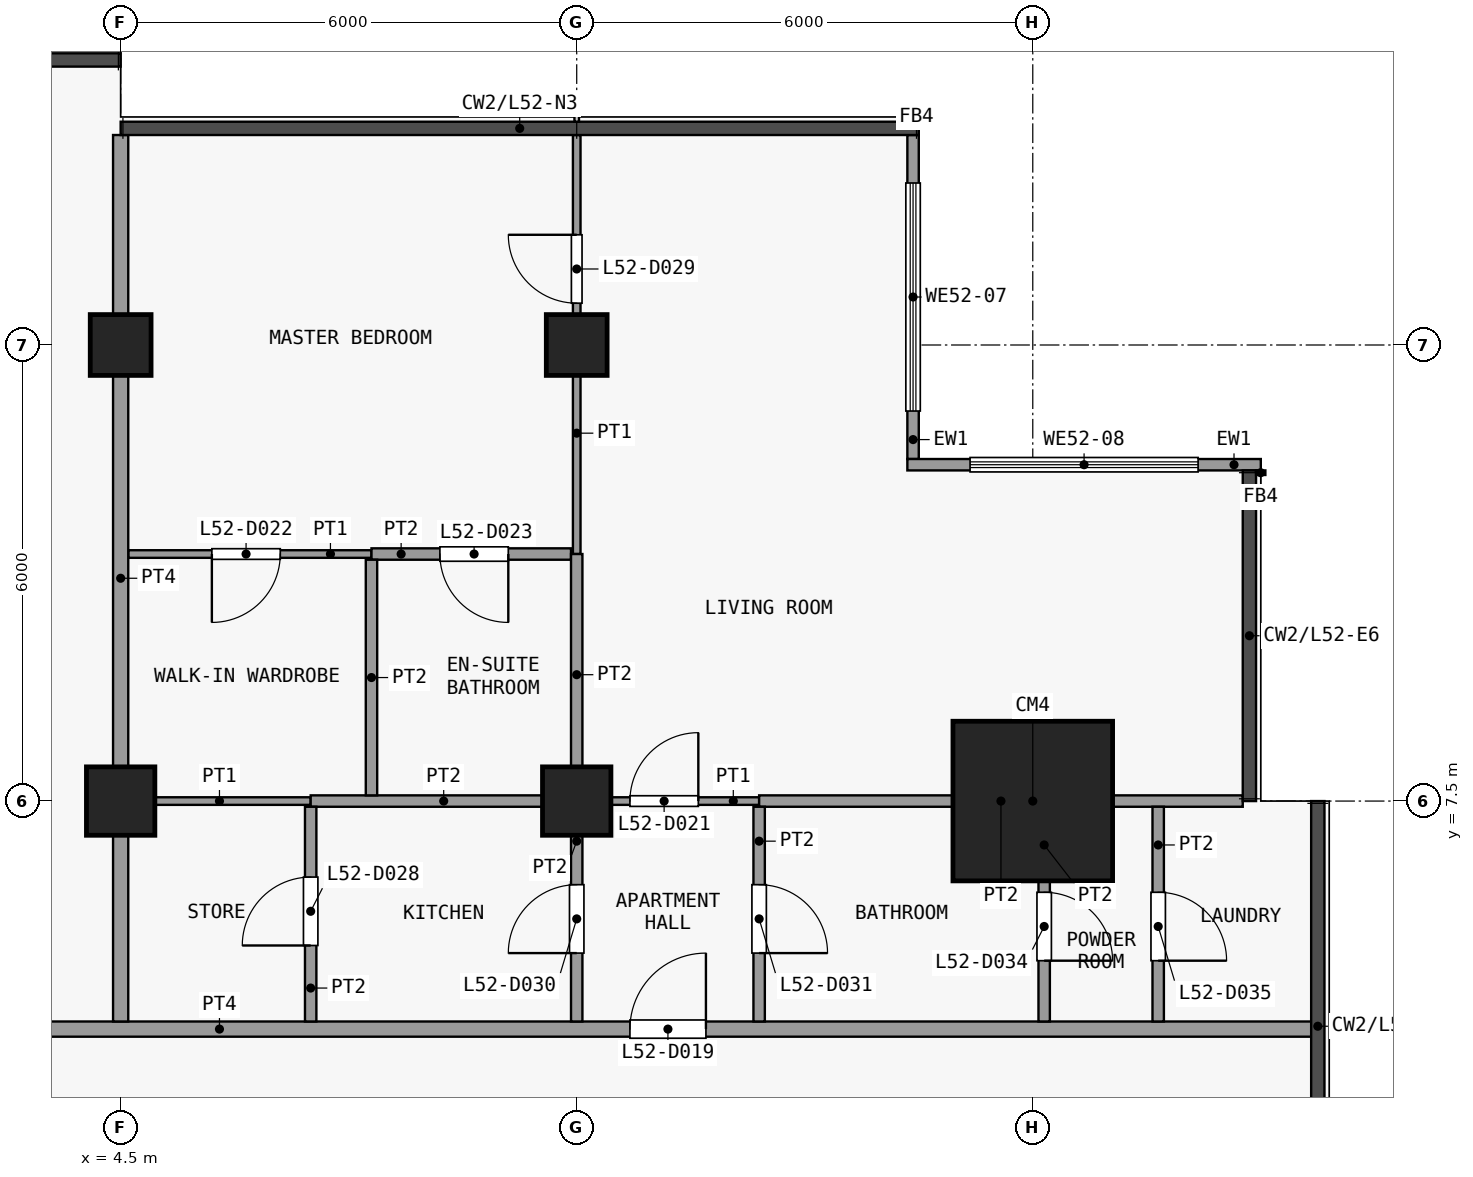
"""IFC4 building model, lengths in metres.
Left out: names, types, materials, properties, quantities, classifications, styles, units other than length and angle.
Written with IfcOpenShell. Run it as: python <this file> out.ifc"""

import sys

from ifc_helpers import new_model, si_unit, direction, frame, frame_2d, origin, origin_2d, place, context, subcontext, project, spatial, rectangle, extrude, element, fill, save


model = new_model("IFC4")
c1 = context("Model", 3, precision=1e-05, world=origin(), true_north=direction((0.0, 1.0)))
c2 = subcontext(c1, "Body", "Model", "MODEL_VIEW")
j1 = project(units=[si_unit("LENGTHUNIT", "METRE"), si_unit("PLANEANGLEUNIT", "RADIAN")], contexts=[c1])
p1 = place(None, origin())
s1 = spatial("IfcSite", under=j1, at=p1, CompositionType="ELEMENT")
p2 = place(p1, origin())
s2 = spatial("IfcBuilding", under=s1, at=p2, CompositionType="ELEMENT")
p3 = place(p2, frame((0.0, 0.0, 208.7)))
s3 = spatial("IfcBuildingStorey", under=s2, at=p3, CompositionType="ELEMENT", Elevation=208.7)
p4 = place(p3, frame((4.5, 7.5, 0.0), z_axis=(0.0, 0.0, 1.0), x_axis=(1.0, 0.0, 0.0)))
e1 = element("IfcColumn", 1, at=p4, inside=s3, PredefinedType="COLUMN", context=c2, shape_type="SweptSolid", body=[
    extrude(rectangle(XDim=0.9, YDim=0.9, at=origin_2d()), origin(), (0.0, 0.0, 1.0), 3.6),
])
p5 = place(p3, frame((4.5, 13.5, 0.0), z_axis=(0.0, 0.0, 1.0), x_axis=(1.0, 0.0, 0.0)))
e2 = element("IfcColumn", 2, at=p5, inside=s3, PredefinedType="COLUMN", context=c2, shape_type="SweptSolid", body=[
    extrude(rectangle(XDim=0.8, YDim=0.8, at=origin_2d()), origin(), (0.0, 0.0, 1.0), 3.6),
])
p6 = place(p3, frame((10.5, 7.5, 0.0), z_axis=(0.0, 0.0, 1.0), x_axis=(1.0, 0.0, 0.0)))
e3 = element("IfcColumn", 3, at=p6, inside=s3, PredefinedType="COLUMN", context=c2, shape_type="SweptSolid", body=[
    extrude(rectangle(XDim=0.9, YDim=0.9, at=origin_2d()), origin(), (0.0, 0.0, 1.0), 3.6),
])
p7 = place(p3, frame((10.5, 13.5, 0.0), z_axis=(0.0, 0.0, 1.0), x_axis=(1.0, 0.0, 0.0)))
e4 = element("IfcColumn", 4, at=p7, inside=s3, PredefinedType="COLUMN", context=c2, shape_type="SweptSolid", body=[
    extrude(rectangle(XDim=0.8, YDim=0.8, at=origin_2d()), origin(), (0.0, 0.0, 1.0), 3.6),
])
p8 = place(p3, frame((16.5, 7.5, 0.0), z_axis=(0.0, 0.0, 1.0), x_axis=(1.0, 0.0, 0.0)))
e5 = element("IfcColumn", 5, at=p8, inside=s3, PredefinedType="COLUMN", context=c2, shape_type="SweptSolid", body=[
    extrude(rectangle(XDim=2.1, YDim=2.1, at=origin_2d()), origin(), (0.0, 0.0, 1.0), 3.6),
])
p9 = place(p3, frame((14.925, 16.262, 0.0), z_axis=(0.0, 0.0, 1.0), x_axis=(0.0, -1.0, 0.0)))
e6 = element("IfcWall", 6, at=p9, inside=s3, PredefinedType="SOLIDWALL", context=c2, shape_type="SweptSolid", body=[
    extrude(rectangle(XDim=4.262, YDim=0.15, at=frame_2d((2.131, 0.0))), origin(), (0.0, 0.0, 1.0), 3.3),
])
p10 = place(p9, frame((0.631, 0.0, 0.9)))
e7 = element("IfcOpeningElement", 7, at=p10, cuts=e6, PredefinedType="OPENING", context=c2, shape_type="SweptSolid", body=[
    extrude(rectangle(XDim=3.0, YDim=2.4, at=frame_2d((1.5, 1.2))), frame((0.0, 0.085, 0.0), z_axis=(0.0, -1.0, 0.0), x_axis=(1.0, 0.0, 0.0)), (0.0, 0.0, 1.0), 0.17),
])
p11 = place(p3, frame((14.85, 11.925, 0.0), z_axis=(0.0, 0.0, 1.0), x_axis=(1.0, 0.0, 0.0)))
e8 = element("IfcWall", 8, at=p11, inside=s3, PredefinedType="SOLIDWALL", context=c2, shape_type="SweptSolid", body=[
    extrude(rectangle(XDim=4.65, YDim=0.15, at=frame_2d((2.325, 0.0))), origin(), (0.0, 0.0, 1.0), 3.3),
])
p12 = place(p11, frame((0.825, 0.0, 0.9)))
e9 = element("IfcOpeningElement", 9, at=p12, cuts=e8, PredefinedType="OPENING", context=c2, shape_type="SweptSolid", body=[
    extrude(rectangle(XDim=3.0, YDim=2.4, at=frame_2d((1.5, 1.2))), frame((0.0, 0.085, 0.0), z_axis=(0.0, -1.0, 0.0), x_axis=(1.0, 0.0, 0.0)), (0.0, 0.0, 1.0), 0.17),
])
p13 = place(p3, frame((-17.85, 4.5, 0.0), z_axis=(0.0, 0.0, 1.0), x_axis=(1.0, 0.0, 0.0)))
e10 = element("IfcWall", 10, at=p13, inside=s3, PredefinedType="PARTITIONING", context=c2, shape_type="SweptSolid", body=[
    extrude(rectangle(XDim=38.1, YDim=0.2, at=frame_2d((19.05, 0.0))), origin(), (0.0, 0.0, 1.0), 3.3),
])
p14 = place(p13, frame((3.05, 0.0, 0.0)))
e11 = element("IfcOpeningElement", 11, at=p14, cuts=e10, PredefinedType="OPENING", context=c2, shape_type="SweptSolid", body=[
    extrude(rectangle(XDim=1.0, YDim=2.1, at=frame_2d((0.5, 1.05))), frame((0.0, 0.11, 0.0), z_axis=(0.0, -1.0, 0.0), x_axis=(1.0, 0.0, 0.0)), (0.0, 0.0, 1.0), 0.22),
])
p15 = place(p13, frame((9.85, 0.0, 0.0)))
e12 = element("IfcOpeningElement", 12, at=p15, cuts=e10, PredefinedType="OPENING", context=c2, shape_type="SweptSolid", body=[
    extrude(rectangle(XDim=0.9, YDim=2.1, at=frame_2d((0.45, 1.05))), frame((0.0, 0.11, 0.0), z_axis=(0.0, -1.0, 0.0), x_axis=(1.0, 0.0, 0.0)), (0.0, 0.0, 1.0), 0.22),
])
p16 = place(p13, frame((17.35, 0.0, 0.0)))
e13 = element("IfcOpeningElement", 13, at=p16, cuts=e10, PredefinedType="OPENING", context=c2, shape_type="SweptSolid", body=[
    extrude(rectangle(XDim=0.9, YDim=2.1, at=frame_2d((0.45, 1.05))), frame((0.0, 0.11, 0.0), z_axis=(0.0, -1.0, 0.0), x_axis=(1.0, 0.0, 0.0)), (0.0, 0.0, 1.0), 0.22),
])
p17 = place(p13, frame((29.05, 0.0, 0.0)))
e14 = element("IfcOpeningElement", 14, at=p17, cuts=e10, PredefinedType="OPENING", context=c2, shape_type="SweptSolid", body=[
    extrude(rectangle(XDim=1.0, YDim=2.1, at=frame_2d((0.5, 1.05))), frame((0.0, 0.11, 0.0), z_axis=(0.0, -1.0, 0.0), x_axis=(1.0, 0.0, 0.0)), (0.0, 0.0, 1.0), 0.22),
])
p18 = place(p3, frame((4.6, 7.5, 0.0), z_axis=(0.0, 0.0, 1.0), x_axis=(1.0, 0.0, 0.0)))
e15 = element("IfcWall", 15, at=p18, inside=s3, PredefinedType="PARTITIONING", context=c2, shape_type="SweptSolid", body=[
    extrude(rectangle(XDim=2.4, YDim=0.1, at=frame_2d((1.2, 0.0))), origin(), (0.0, 0.0, 1.0), 3.3),
])
p19 = place(p3, frame((10.5, 7.5, 0.0), z_axis=(0.0, 0.0, 1.0), x_axis=(1.0, 0.0, 0.0)))
e16 = element("IfcWall", 16, at=p19, inside=s3, PredefinedType="PARTITIONING", context=c2, shape_type="SweptSolid", body=[
    extrude(rectangle(XDim=2.4, YDim=0.1, at=frame_2d((1.2, 0.0))), origin(), (0.0, 0.0, 1.0), 3.3),
])
p20 = place(p19, frame((0.7, 0.0, 0.0)))
e17 = element("IfcOpeningElement", 17, at=p20, cuts=e16, PredefinedType="OPENING", context=c2, shape_type="SweptSolid", body=[
    extrude(rectangle(XDim=0.9, YDim=2.1, at=frame_2d((0.45, 1.05))), frame((0.0, 0.06, 0.0), z_axis=(0.0, -1.0, 0.0), x_axis=(1.0, 0.0, 0.0)), (0.0, 0.0, 1.0), 0.12),
])
p21 = place(p3, frame((7.0, 7.5, 0.0), z_axis=(0.0, 0.0, 1.0), x_axis=(1.0, 0.0, 0.0)))
e18 = element("IfcWall", 18, at=p21, inside=s3, PredefinedType="PARTITIONING", context=c2, shape_type="SweptSolid", body=[
    extrude(rectangle(XDim=3.5, YDim=0.15, at=frame_2d((1.75, 0.0))), origin(), (0.0, 0.0, 1.0), 3.3),
])
p22 = place(p3, frame((12.9, 7.5, 0.0), z_axis=(0.0, 0.0, 1.0), x_axis=(1.0, 0.0, 0.0)))
e19 = element("IfcWall", 19, at=p22, inside=s3, PredefinedType="PARTITIONING", context=c2, shape_type="SweptSolid", body=[
    extrude(rectangle(XDim=6.363, YDim=0.15, at=frame_2d((3.181, 0.0))), origin(), (0.0, 0.0, 1.0), 3.3),
])
p23 = place(p3, frame((4.6, 10.75, 0.0), z_axis=(0.0, 0.0, 1.0), x_axis=(1.0, 0.0, 0.0)))
e20 = element("IfcWall", 20, at=p23, inside=s3, PredefinedType="PARTITIONING", context=c2, shape_type="SweptSolid", body=[
    extrude(rectangle(XDim=3.2, YDim=0.1, at=frame_2d((1.6, 0.0))), origin(), (0.0, 0.0, 1.0), 3.3),
])
p24 = place(p23, frame((1.1, 0.0, 0.0)))
e21 = element("IfcOpeningElement", 21, at=p24, cuts=e20, PredefinedType="OPENING", context=c2, shape_type="SweptSolid", body=[
    extrude(rectangle(XDim=0.9, YDim=2.1, at=frame_2d((0.45, 1.05))), frame((0.0, 0.06, 0.0), z_axis=(0.0, -1.0, 0.0), x_axis=(1.0, 0.0, 0.0)), (0.0, 0.0, 1.0), 0.12),
])
p25 = place(p3, frame((7.8, 10.75, 0.0), z_axis=(0.0, 0.0, 1.0), x_axis=(1.0, 0.0, 0.0)))
e22 = element("IfcWall", 22, at=p25, inside=s3, PredefinedType="PARTITIONING", context=c2, shape_type="SweptSolid", body=[
    extrude(rectangle(XDim=2.625, YDim=0.15, at=frame_2d((1.312, 0.0))), origin(), (0.0, 0.0, 1.0), 3.3),
])
p26 = place(p25, frame((0.9, 0.0, 0.0)))
e23 = element("IfcOpeningElement", 23, at=p26, cuts=e22, PredefinedType="OPENING", context=c2, shape_type="SweptSolid", body=[
    extrude(rectangle(XDim=0.9, YDim=2.1, at=frame_2d((0.45, 1.05))), frame((0.0, 0.085, 0.0), z_axis=(0.0, -1.0, 0.0), x_axis=(1.0, 0.0, 0.0)), (0.0, 0.0, 1.0), 0.17),
])
p27 = place(p3, frame((4.5, 4.6, 0.0), z_axis=(0.0, 0.0, 1.0), x_axis=(0.0, 1.0, 0.0)))
e24 = element("IfcWall", 24, at=p27, inside=s3, PredefinedType="PARTITIONING", context=c2, shape_type="SweptSolid", body=[
    extrude(rectangle(XDim=11.662, YDim=0.2, at=frame_2d((5.831, 0.0))), origin(), (0.0, 0.0, 1.0), 3.3),
])
p28 = place(p3, frame((7.0, 4.6, 0.0), z_axis=(0.0, 0.0, 1.0), x_axis=(0.0, 1.0, 0.0)))
e25 = element("IfcWall", 25, at=p28, inside=s3, PredefinedType="PARTITIONING", context=c2, shape_type="SweptSolid", body=[
    extrude(rectangle(XDim=2.825, YDim=0.15, at=frame_2d((1.413, 0.0))), origin(), (0.0, 0.0, 1.0), 3.3),
])
p29 = place(p28, frame((1.0, 0.0, 0.0)))
e26 = element("IfcOpeningElement", 26, at=p29, cuts=e25, PredefinedType="OPENING", context=c2, shape_type="SweptSolid", body=[
    extrude(rectangle(XDim=0.9, YDim=2.1, at=frame_2d((0.45, 1.05))), frame((0.0, 0.085, 0.0), z_axis=(0.0, -1.0, 0.0), x_axis=(1.0, 0.0, 0.0)), (0.0, 0.0, 1.0), 0.17),
])
p30 = place(p3, frame((7.8, 7.575, 0.0), z_axis=(0.0, 0.0, 1.0), x_axis=(0.0, 1.0, 0.0)))
e27 = element("IfcWall", 27, at=p30, inside=s3, PredefinedType="PARTITIONING", context=c2, shape_type="SweptSolid", body=[
    extrude(rectangle(XDim=3.1, YDim=0.15, at=frame_2d((1.55, 0.0))), origin(), (0.0, 0.0, 1.0), 3.3),
])
p31 = place(p3, frame((10.5, 10.75, 0.0), z_axis=(0.0, 0.0, 1.0), x_axis=(0.0, 1.0, 0.0)))
e28 = element("IfcWall", 28, at=p31, inside=s3, PredefinedType="PARTITIONING", context=c2, shape_type="SweptSolid", body=[
    extrude(rectangle(XDim=5.512, YDim=0.1, at=frame_2d((2.756, 0.0))), origin(), (0.0, 0.0, 1.0), 3.3),
])
p32 = place(p31, frame((3.3, 0.0, 0.0)))
e29 = element("IfcOpeningElement", 29, at=p32, cuts=e28, PredefinedType="OPENING", context=c2, shape_type="SweptSolid", body=[
    extrude(rectangle(XDim=0.9, YDim=2.1, at=frame_2d((0.45, 1.05))), frame((0.0, 0.06, 0.0), z_axis=(0.0, -1.0, 0.0), x_axis=(1.0, 0.0, 0.0)), (0.0, 0.0, 1.0), 0.12),
])
p33 = place(p3, frame((10.5, 4.6, 0.0), z_axis=(0.0, 0.0, 1.0), x_axis=(0.0, 1.0, 0.0)))
e30 = element("IfcWall", 30, at=p33, inside=s3, PredefinedType="PARTITIONING", context=c2, shape_type="SweptSolid", body=[
    extrude(rectangle(XDim=2.825, YDim=0.15, at=frame_2d((1.413, 0.0))), origin(), (0.0, 0.0, 1.0), 3.3),
])
p34 = place(p33, frame((0.9, 0.0, 0.0)))
e31 = element("IfcOpeningElement", 31, at=p34, cuts=e30, PredefinedType="OPENING", context=c2, shape_type="SweptSolid", body=[
    extrude(rectangle(XDim=0.9, YDim=2.1, at=frame_2d((0.45, 1.05))), frame((0.0, 0.085, 0.0), z_axis=(0.0, -1.0, 0.0), x_axis=(1.0, 0.0, 0.0)), (0.0, 0.0, 1.0), 0.17),
])
p35 = place(p3, frame((10.5, 7.575, 0.0), z_axis=(0.0, 0.0, 1.0), x_axis=(0.0, 1.0, 0.0)))
e32 = element("IfcWall", 32, at=p35, inside=s3, PredefinedType="PARTITIONING", context=c2, shape_type="SweptSolid", body=[
    extrude(rectangle(XDim=3.175, YDim=0.15, at=frame_2d((1.587, 0.0))), origin(), (0.0, 0.0, 1.0), 3.3),
])
p36 = place(p3, frame((12.9, 4.6, 0.0), z_axis=(0.0, 0.0, 1.0), x_axis=(0.0, 1.0, 0.0)))
e33 = element("IfcWall", 33, at=p36, inside=s3, PredefinedType="PARTITIONING", context=c2, shape_type="SweptSolid", body=[
    extrude(rectangle(XDim=2.825, YDim=0.15, at=frame_2d((1.413, 0.0))), origin(), (0.0, 0.0, 1.0), 3.3),
])
p37 = place(p36, frame((0.9, 0.0, 0.0)))
e34 = element("IfcOpeningElement", 34, at=p37, cuts=e33, PredefinedType="OPENING", context=c2, shape_type="SweptSolid", body=[
    extrude(rectangle(XDim=0.9, YDim=2.1, at=frame_2d((0.45, 1.05))), frame((0.0, 0.085, 0.0), z_axis=(0.0, -1.0, 0.0), x_axis=(1.0, 0.0, 0.0)), (0.0, 0.0, 1.0), 0.17),
])
p38 = place(p3, frame((16.65, 4.6, 0.0), z_axis=(0.0, 0.0, 1.0), x_axis=(0.0, 1.0, 0.0)))
e35 = element("IfcWall", 35, at=p38, inside=s3, PredefinedType="PARTITIONING", context=c2, shape_type="SweptSolid", body=[
    extrude(rectangle(XDim=2.825, YDim=0.15, at=frame_2d((1.413, 0.0))), origin(), (0.0, 0.0, 1.0), 3.3),
])
p39 = place(p38, frame((0.8, 0.0, 0.0)))
e36 = element("IfcOpeningElement", 36, at=p39, cuts=e35, PredefinedType="OPENING", context=c2, shape_type="SweptSolid", body=[
    extrude(rectangle(XDim=0.9, YDim=2.1, at=frame_2d((0.45, 1.05))), frame((0.0, 0.085, 0.0), z_axis=(0.0, -1.0, 0.0), x_axis=(1.0, 0.0, 0.0)), (0.0, 0.0, 1.0), 0.17),
])
p40 = place(p3, frame((18.15, 4.6, 0.0), z_axis=(0.0, 0.0, 1.0), x_axis=(0.0, 1.0, 0.0)))
e37 = element("IfcWall", 37, at=p40, inside=s3, PredefinedType="PARTITIONING", context=c2, shape_type="SweptSolid", body=[
    extrude(rectangle(XDim=2.825, YDim=0.15, at=frame_2d((1.413, 0.0))), origin(), (0.0, 0.0, 1.0), 3.3),
])
p41 = place(p40, frame((0.8, 0.0, 0.0)))
e38 = element("IfcOpeningElement", 38, at=p41, cuts=e37, PredefinedType="OPENING", context=c2, shape_type="SweptSolid", body=[
    extrude(rectangle(XDim=0.9, YDim=2.1, at=frame_2d((0.45, 1.05))), frame((0.0, 0.085, 0.0), z_axis=(0.0, -1.0, 0.0), x_axis=(1.0, 0.0, 0.0)), (0.0, 0.0, 1.0), 0.17),
])
p42 = place(p10, origin())
e39 = element("IfcWindow", 39, at=p42, inside=s3, PartitioningType="SINGLE_PANEL", PredefinedType="WINDOW", context=c2, shape_type="SweptSolid", body=[
    extrude(rectangle(XDim=3.0, YDim=2.4, at=frame_2d((1.5, 1.2))), frame((0.0, 0.03, 0.0), z_axis=(0.0, -1.0, 0.0), x_axis=(1.0, 0.0, 0.0)), (0.0, 0.0, 1.0), 0.06),
])
fill(e7, e39)
p43 = place(p12, origin())
e40 = element("IfcWindow", 40, at=p43, inside=s3, PartitioningType="SINGLE_PANEL", PredefinedType="WINDOW", context=c2, shape_type="SweptSolid", body=[
    extrude(rectangle(XDim=3.0, YDim=2.4, at=frame_2d((1.5, 1.2))), frame((0.0, 0.03, 0.0), z_axis=(0.0, -1.0, 0.0), x_axis=(1.0, 0.0, 0.0)), (0.0, 0.0, 1.0), 0.06),
])
fill(e9, e40)
p44 = place(p17, origin())
e41 = element("IfcDoor", 41, at=p44, inside=s3, OperationType="SINGLE_SWING_LEFT", PredefinedType="DOOR", context=c2, shape_type="SweptSolid", body=[
    extrude(rectangle(XDim=1.0, YDim=2.1, at=frame_2d((0.5, 1.05))), frame((0.0, 0.025, 0.0), z_axis=(0.0, -1.0, 0.0), x_axis=(1.0, 0.0, 0.0)), (0.0, 0.0, 1.0), 0.05),
])
fill(e14, e41)
p45 = place(p20, origin())
e42 = element("IfcDoor", 42, at=p45, inside=s3, OperationType="SINGLE_SWING_LEFT", PredefinedType="DOOR", context=c2, shape_type="SweptSolid", body=[
    extrude(rectangle(XDim=0.9, YDim=2.1, at=frame_2d((0.45, 1.05))), frame((0.0, 0.025, 0.0), z_axis=(0.0, -1.0, 0.0), x_axis=(1.0, 0.0, 0.0)), (0.0, 0.0, 1.0), 0.05),
])
fill(e17, e42)
p46 = place(p24, origin())
e43 = element("IfcDoor", 43, at=p46, inside=s3, OperationType="SINGLE_SWING_LEFT", PredefinedType="DOOR", context=c2, shape_type="SweptSolid", body=[
    extrude(rectangle(XDim=0.9, YDim=2.1, at=frame_2d((0.45, 1.05))), frame((0.0, 0.025, 0.0), z_axis=(0.0, -1.0, 0.0), x_axis=(1.0, 0.0, 0.0)), (0.0, 0.0, 1.0), 0.05),
])
fill(e21, e43)
p47 = place(p26, origin())
e44 = element("IfcDoor", 44, at=p47, inside=s3, OperationType="SINGLE_SWING_RIGHT", PredefinedType="DOOR", context=c2, shape_type="SweptSolid", body=[
    extrude(rectangle(XDim=0.9, YDim=2.1, at=frame_2d((0.45, 1.05))), frame((0.0, 0.025, 0.0), z_axis=(0.0, -1.0, 0.0), x_axis=(1.0, 0.0, 0.0)), (0.0, 0.0, 1.0), 0.05),
])
fill(e23, e44)
p48 = place(p29, origin())
e45 = element("IfcDoor", 45, at=p48, inside=s3, OperationType="SINGLE_SWING_RIGHT", PredefinedType="DOOR", context=c2, shape_type="SweptSolid", body=[
    extrude(rectangle(XDim=0.9, YDim=2.1, at=frame_2d((0.45, 1.05))), frame((0.0, 0.025, 0.0), z_axis=(0.0, -1.0, 0.0), x_axis=(1.0, 0.0, 0.0)), (0.0, 0.0, 1.0), 0.05),
])
fill(e26, e45)
p49 = place(p32, origin())
e46 = element("IfcDoor", 46, at=p49, inside=s3, OperationType="SINGLE_SWING_LEFT", PredefinedType="DOOR", context=c2, shape_type="SweptSolid", body=[
    extrude(rectangle(XDim=0.9, YDim=2.1, at=frame_2d((0.45, 1.05))), frame((0.0, 0.025, 0.0), z_axis=(0.0, -1.0, 0.0), x_axis=(1.0, 0.0, 0.0)), (0.0, 0.0, 1.0), 0.05),
])
fill(e29, e46)
p50 = place(p34, origin())
e47 = element("IfcDoor", 47, at=p50, inside=s3, OperationType="SINGLE_SWING_RIGHT", PredefinedType="DOOR", context=c2, shape_type="SweptSolid", body=[
    extrude(rectangle(XDim=0.9, YDim=2.1, at=frame_2d((0.45, 1.05))), frame((0.0, 0.025, 0.0), z_axis=(0.0, -1.0, 0.0), x_axis=(1.0, 0.0, 0.0)), (0.0, 0.0, 1.0), 0.05),
])
fill(e31, e47)
p51 = place(p37, origin())
e48 = element("IfcDoor", 48, at=p51, inside=s3, OperationType="SINGLE_SWING_LEFT", PredefinedType="DOOR", context=c2, shape_type="SweptSolid", body=[
    extrude(rectangle(XDim=0.9, YDim=2.1, at=frame_2d((0.45, 1.05))), frame((0.0, 0.025, 0.0), z_axis=(0.0, -1.0, 0.0), x_axis=(1.0, 0.0, 0.0)), (0.0, 0.0, 1.0), 0.05),
])
fill(e34, e48)
p52 = place(p39, origin())
e49 = element("IfcDoor", 49, at=p52, inside=s3, OperationType="SINGLE_SWING_LEFT", PredefinedType="DOOR", context=c2, shape_type="SweptSolid", body=[
    extrude(rectangle(XDim=0.9, YDim=2.1, at=frame_2d((0.45, 1.05))), frame((0.0, 0.025, 0.0), z_axis=(0.0, -1.0, 0.0), x_axis=(1.0, 0.0, 0.0)), (0.0, 0.0, 1.0), 0.05),
])
fill(e36, e49)
p53 = place(p41, origin())
e50 = element("IfcDoor", 50, at=p53, inside=s3, OperationType="SINGLE_SWING_LEFT", PredefinedType="DOOR", context=c2, shape_type="SweptSolid", body=[
    extrude(rectangle(XDim=0.9, YDim=2.1, at=frame_2d((0.45, 1.05))), frame((0.0, 0.025, 0.0), z_axis=(0.0, -1.0, 0.0), x_axis=(1.0, 0.0, 0.0)), (0.0, 0.0, 1.0), 0.05),
])
fill(e38, e50)
save(model, sys.argv[1])
